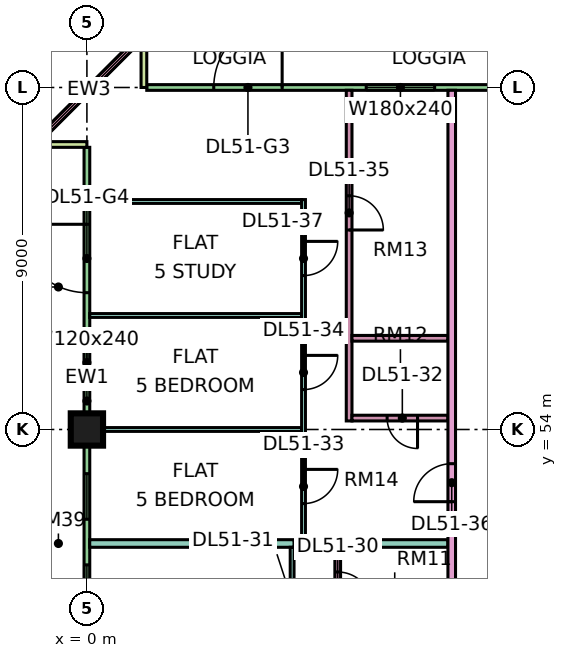
"""IFC4 building model, lengths in metres.
Left out: names, types, materials, properties, quantities, classifications, styles, units other than length and angle.
Written with IfcOpenShell. Run it as: python <this file> out.ifc"""

import sys

from ifc_helpers import new_model, si_unit, direction, frame, frame_2d, origin, origin_2d, place, context, subcontext, project, spatial, rectangle, extrude, element, fill, save


model = new_model("IFC4")
c1 = context("Model", 3, precision=1e-05, world=origin(), true_north=direction((0.0, 1.0)))
c2 = subcontext(c1, "Body", "Model", "MODEL_VIEW")
j1 = project(units=[si_unit("LENGTHUNIT", "METRE"), si_unit("PLANEANGLEUNIT", "RADIAN")], contexts=[c1])
p1 = place(None, origin())
s1 = spatial("IfcSite", under=j1, at=p1, CompositionType="ELEMENT")
p2 = place(p1, origin())
s2 = spatial("IfcBuilding", under=s1, at=p2, CompositionType="ELEMENT")
p3 = place(p2, frame((0.0, 0.0, 219.15)))
s3 = spatial("IfcBuildingStorey", under=s2, at=p3, CompositionType="ELEMENT", Elevation=219.15)
p4 = place(p3, frame((0.0, 54.0, 0.0), z_axis=(0.0, 0.0, 1.0), x_axis=(1.0, 0.0, 0.0)))
e1 = element("IfcColumn", 1, at=p4, inside=s3, PredefinedType="COLUMN", context=c2, shape_type="SweptSolid", body=[
    extrude(rectangle(XDim=0.85, YDim=0.85, at=origin_2d()), origin(), (0.0, 0.0, 1.0), 3.75),
])
p5 = place(p3, frame((11.925, 63.0, 0.0), z_axis=(0.0, 0.0, 1.0), x_axis=(-1.0, 0.0, 0.0)))
e2 = element("IfcWall", 2, at=p5, inside=s3, PredefinedType="SOLIDWALL", context=c2, shape_type="SweptSolid", body=[
    extrude(rectangle(XDim=10.35, YDim=0.15, at=frame_2d((5.175, 0.0))), origin(), (0.0, 0.0, 1.0), 3.35),
])
p6 = place(p5, frame((2.775, 0.0, 0.45)))
e3 = element("IfcOpeningElement", 3, at=p6, cuts=e2, PredefinedType="OPENING", context=c2, shape_type="SweptSolid", body=[
    extrude(rectangle(XDim=1.8, YDim=2.4, at=frame_2d((0.9, 1.2))), frame((0.0, 0.085, 0.0), z_axis=(0.0, -1.0, 0.0), x_axis=(1.0, 0.0, 0.0)), (0.0, 0.0, 1.0), 0.17),
])
p7 = place(p5, frame((6.788, 0.0, 0.0)))
e4 = element("IfcOpeningElement", 4, at=p7, cuts=e2, PredefinedType="OPENING", context=c2, shape_type="SweptSolid", body=[
    extrude(rectangle(XDim=1.8, YDim=2.4, at=frame_2d((0.9, 1.2))), frame((0.0, 0.085, 0.0), z_axis=(0.0, -1.0, 0.0), x_axis=(1.0, 0.0, 0.0)), (0.0, 0.0, 1.0), 0.17),
])
p8 = place(p3, frame((1.5, 64.5, 0.0), z_axis=(0.0, 0.0, 1.0), x_axis=(0.0, -1.0, 0.0)))
e5 = element("IfcWall", 5, at=p8, inside=s3, PredefinedType="SOLIDWALL", context=c2, shape_type="SweptSolid", body=[
    extrude(rectangle(XDim=1.5, YDim=0.15, at=frame_2d((0.75, 0.0))), origin(), (0.0, 0.0, 1.0), 3.35),
])
p9 = place(p3, frame((1.553, 64.447, 0.0), z_axis=(0.0, 0.0, 1.0), x_axis=(-0.707106781187, -0.707106781187, 0.0)))
e6 = element("IfcWall", 6, at=p9, inside=s3, PredefinedType="SOLIDWALL", context=c2, shape_type="SweptSolid", body=[
    extrude(rectangle(XDim=4.243, YDim=0.15, at=frame_2d((2.121, 0.0))), origin(), (0.0, 0.0, 1.0), 3.35),
])
p10 = place(p9, frame((0.621, 0.0, 0.45)))
e7 = element("IfcOpeningElement", 7, at=p10, cuts=e6, PredefinedType="OPENING", context=c2, shape_type="SweptSolid", body=[
    extrude(rectangle(XDim=3.0, YDim=2.4, at=frame_2d((1.5, 1.2))), frame((0.0, 0.085, 0.0), z_axis=(0.0, -1.0, 0.0), x_axis=(1.0, 0.0, 0.0)), (0.0, 0.0, 1.0), 0.17),
])
p11 = place(p3, frame((0.0, 61.425, 0.0), z_axis=(0.0, 0.0, 1.0), x_axis=(0.0, -1.0, 0.0)))
e8 = element("IfcWall", 8, at=p11, inside=s3, PredefinedType="SOLIDWALL", context=c2, shape_type="SweptSolid", body=[
    extrude(rectangle(XDim=13.35, YDim=0.15, at=frame_2d((6.675, 0.0))), origin(), (0.0, 0.0, 1.0), 3.35),
])
p12 = place(p11, frame((2.025, 0.0, 0.0)))
e9 = element("IfcOpeningElement", 9, at=p12, cuts=e8, PredefinedType="OPENING", context=c2, shape_type="SweptSolid", body=[
    extrude(rectangle(XDim=1.8, YDim=2.4, at=frame_2d((0.9, 1.2))), frame((0.0, 0.085, 0.0), z_axis=(0.0, -1.0, 0.0), x_axis=(1.0, 0.0, 0.0)), (0.0, 0.0, 1.0), 0.17),
])
p13 = place(p11, frame((5.062, 0.0, 0.45)))
e10 = element("IfcOpeningElement", 10, at=p13, cuts=e8, PredefinedType="OPENING", context=c2, shape_type="SweptSolid", body=[
    extrude(rectangle(XDim=1.2, YDim=2.4, at=frame_2d((0.6, 1.2))), frame((0.0, 0.085, 0.0), z_axis=(0.0, -1.0, 0.0), x_axis=(1.0, 0.0, 0.0)), (0.0, 0.0, 1.0), 0.17),
])
p14 = place(p11, frame((8.587, 0.0, 0.45)))
e11 = element("IfcOpeningElement", 11, at=p14, cuts=e8, PredefinedType="OPENING", context=c2, shape_type="SweptSolid", body=[
    extrude(rectangle(XDim=1.2, YDim=2.4, at=frame_2d((0.6, 1.2))), frame((0.0, 0.085, 0.0), z_axis=(0.0, -1.0, 0.0), x_axis=(1.0, 0.0, 0.0)), (0.0, 0.0, 1.0), 0.17),
])
p15 = place(p11, frame((10.988, 0.0, 0.45)))
e12 = element("IfcOpeningElement", 12, at=p15, cuts=e8, PredefinedType="OPENING", context=c2, shape_type="SweptSolid", body=[
    extrude(rectangle(XDim=1.8, YDim=2.4, at=frame_2d((0.9, 1.2))), frame((0.0, 0.085, 0.0), z_axis=(0.0, -1.0, 0.0), x_axis=(1.0, 0.0, 0.0)), (0.0, 0.0, 1.0), 0.17),
])
p16 = place(p3, frame((-1.5, 61.5, 0.0), z_axis=(0.0, 0.0, 1.0), x_axis=(1.0, 0.0, 0.0)))
e13 = element("IfcWall", 13, at=p16, inside=s3, PredefinedType="SOLIDWALL", context=c2, shape_type="SweptSolid", body=[
    extrude(rectangle(XDim=1.5, YDim=0.15, at=frame_2d((0.75, 0.0))), origin(), (0.0, 0.0, 1.0), 3.35),
])
p17 = place(p3, frame((0.074, 51.0, 0.0), z_axis=(0.0, 0.0, 1.0), x_axis=(1.0, 0.0, 0.0)))
e14 = element("IfcWall", 14, at=p17, inside=s3, PredefinedType="PARTITIONING", context=c2, shape_type="SweptSolid", body=[
    extrude(rectangle(XDim=5.376, YDim=0.2, at=frame_2d((2.688, 0.0))), origin(), (0.0, 0.0, 1.0), 3.35),
])
for number, where, z_axis, x_axis in (
    (15, (0.074, 54.0, 0.0), (0.0, 0.0, 1.0), (1.0, 0.0, 0.0)),
    (16, (0.074, 57.0, 0.0), (0.0, 0.0, 1.0), (1.0, 0.0, 0.0)),
    (17, (0.074, 60.0, 0.0), (0.0, 0.0, 1.0), (1.0, 0.0, 0.0)),
):
    element("IfcWall", number, at=place(p3, frame(where, z_axis=z_axis, x_axis=x_axis)), inside=s3, PredefinedType="PARTITIONING", context=c2, shape_type="SweptSolid", body=[
        extrude(rectangle(XDim=5.576, YDim=0.1, at=frame_2d((2.788, 0.0))), origin(), (0.0, 0.0, 1.0), 3.35),
    ])
p18 = place(p3, frame((5.4, 48.05, 0.0), z_axis=(0.0, 0.0, 1.0), x_axis=(0.0, 1.0, 0.0)))
e18 = element("IfcWall", 18, at=p18, inside=s3, PredefinedType="PARTITIONING", context=c2, shape_type="SweptSolid", body=[
    extrude(rectangle(XDim=2.85, YDim=0.1, at=frame_2d((1.425, 0.0))), origin(), (0.0, 0.0, 1.0), 3.35),
])
p19 = place(p18, frame((1.0, 0.0, 0.0)))
e19 = element("IfcOpeningElement", 19, at=p19, cuts=e18, PredefinedType="OPENING", context=c2, shape_type="SweptSolid", body=[
    extrude(rectangle(XDim=0.9, YDim=2.1, at=frame_2d((0.45, 1.05))), frame((0.0, 0.06, 0.0), z_axis=(0.0, -1.0, 0.0), x_axis=(1.0, 0.0, 0.0)), (0.0, 0.0, 1.0), 0.12),
])
p20 = place(p3, frame((5.65, 51.0, 0.0), z_axis=(0.0, 0.0, 1.0), x_axis=(1.0, 0.0, 0.0)))
e20 = element("IfcWall", 20, at=p20, inside=s3, PredefinedType="PARTITIONING", context=c2, shape_type="SweptSolid", body=[
    extrude(rectangle(XDim=3.85, YDim=0.2, at=frame_2d((1.925, 0.0))), origin(), (0.0, 0.0, 1.0), 3.35),
])
p21 = place(p3, frame((5.7, 51.1, 0.0), z_axis=(0.0, 0.0, 1.0), x_axis=(0.0, 1.0, 0.0)))
e21 = element("IfcWall", 21, at=p21, inside=s3, PredefinedType="PARTITIONING", context=c2, shape_type="SweptSolid", body=[
    extrude(rectangle(XDim=8.95, YDim=0.1, at=frame_2d((4.475, 0.0))), origin(), (0.0, 0.0, 1.0), 3.35),
])
p22 = place(p21, frame((0.95, 0.0, 0.0)))
e22 = element("IfcOpeningElement", 22, at=p22, cuts=e21, PredefinedType="OPENING", context=c2, shape_type="SweptSolid", body=[
    extrude(rectangle(XDim=0.9, YDim=2.1, at=frame_2d((0.45, 1.05))), frame((0.0, 0.06, 0.0), z_axis=(0.0, -1.0, 0.0), x_axis=(1.0, 0.0, 0.0)), (0.0, 0.0, 1.0), 0.12),
])
p23 = place(p21, frame((3.95, 0.0, 0.0)))
e23 = element("IfcOpeningElement", 23, at=p23, cuts=e21, PredefinedType="OPENING", context=c2, shape_type="SweptSolid", body=[
    extrude(rectangle(XDim=0.9, YDim=2.1, at=frame_2d((0.45, 1.05))), frame((0.0, 0.06, 0.0), z_axis=(0.0, -1.0, 0.0), x_axis=(1.0, 0.0, 0.0)), (0.0, 0.0, 1.0), 0.12),
])
p24 = place(p21, frame((6.95, 0.0, 0.0)))
e24 = element("IfcOpeningElement", 24, at=p24, cuts=e21, PredefinedType="OPENING", context=c2, shape_type="SweptSolid", body=[
    extrude(rectangle(XDim=0.9, YDim=2.1, at=frame_2d((0.45, 1.05))), frame((0.0, 0.06, 0.0), z_axis=(0.0, -1.0, 0.0), x_axis=(1.0, 0.0, 0.0)), (0.0, 0.0, 1.0), 0.12),
])
p25 = place(p3, frame((6.6, 39.25, 0.0), z_axis=(0.0, 0.0, 1.0), x_axis=(0.0, 1.0, 0.0)))
e25 = element("IfcWall", 25, at=p25, inside=s3, PredefinedType="PARTITIONING", context=c2, shape_type="SweptSolid", body=[
    extrude(rectangle(XDim=11.65, YDim=0.15, at=frame_2d((5.825, 0.0))), origin(), (0.0, 0.0, 1.0), 3.35),
])
p26 = place(p25, frame((3.5, 0.0, 0.0)))
e26 = element("IfcOpeningElement", 26, at=p26, cuts=e25, PredefinedType="OPENING", context=c2, shape_type="SweptSolid", body=[
    extrude(rectangle(XDim=0.8, YDim=2.1, at=frame_2d((0.4, 1.05))), frame((0.0, 0.085, 0.0), z_axis=(0.0, -1.0, 0.0), x_axis=(1.0, 0.0, 0.0)), (0.0, 0.0, 1.0), 0.17),
])
p27 = place(p25, frame((7.1, 0.0, 0.0)))
e27 = element("IfcOpeningElement", 27, at=p27, cuts=e25, PredefinedType="OPENING", context=c2, shape_type="SweptSolid", body=[
    extrude(rectangle(XDim=0.9, YDim=2.1, at=frame_2d((0.45, 1.05))), frame((0.0, 0.085, 0.0), z_axis=(0.0, -1.0, 0.0), x_axis=(1.0, 0.0, 0.0)), (0.0, 0.0, 1.0), 0.17),
])
p28 = place(p25, frame((10.1, 0.0, 0.0)))
e28 = element("IfcOpeningElement", 28, at=p28, cuts=e25, PredefinedType="OPENING", context=c2, shape_type="SweptSolid", body=[
    extrude(rectangle(XDim=0.9, YDim=2.1, at=frame_2d((0.45, 1.05))), frame((0.0, 0.085, 0.0), z_axis=(0.0, -1.0, 0.0), x_axis=(1.0, 0.0, 0.0)), (0.0, 0.0, 1.0), 0.17),
])
p29 = place(p3, frame((6.9, 54.225, 0.0), z_axis=(0.0, 0.0, 1.0), x_axis=(0.0, 1.0, 0.0)))
e29 = element("IfcWall", 29, at=p29, inside=s3, PredefinedType="PARTITIONING", context=c2, shape_type="SweptSolid", body=[
    extrude(rectangle(XDim=8.701, YDim=0.15, at=frame_2d((4.351, 0.0))), origin(), (0.0, 0.0, 1.0), 3.35),
])
p30 = place(p29, frame((5.025, 0.0, 0.0)))
e30 = element("IfcOpeningElement", 30, at=p30, cuts=e29, PredefinedType="OPENING", context=c2, shape_type="SweptSolid", body=[
    extrude(rectangle(XDim=0.9, YDim=2.1, at=frame_2d((0.45, 1.05))), frame((0.0, 0.085, 0.0), z_axis=(0.0, -1.0, 0.0), x_axis=(1.0, 0.0, 0.0)), (0.0, 0.0, 1.0), 0.17),
])
p31 = place(p3, frame((6.975, 54.3, 0.0), z_axis=(0.0, 0.0, 1.0), x_axis=(1.0, 0.0, 0.0)))
e31 = element("IfcWall", 31, at=p31, inside=s3, PredefinedType="PARTITIONING", context=c2, shape_type="SweptSolid", body=[
    extrude(rectangle(XDim=2.525, YDim=0.15, at=frame_2d((1.262, 0.0))), origin(), (0.0, 0.0, 1.0), 3.35),
])
p32 = place(p31, frame((0.925, 0.0, 0.0)))
e32 = element("IfcOpeningElement", 32, at=p32, cuts=e31, PredefinedType="OPENING", context=c2, shape_type="SweptSolid", body=[
    extrude(rectangle(XDim=0.8, YDim=2.1, at=frame_2d((0.4, 1.05))), frame((0.0, 0.085, 0.0), z_axis=(0.0, -1.0, 0.0), x_axis=(1.0, 0.0, 0.0)), (0.0, 0.0, 1.0), 0.17),
])
p33 = place(p3, frame((6.975, 56.4, 0.0), z_axis=(0.0, 0.0, 1.0), x_axis=(1.0, 0.0, 0.0)))
e33 = element("IfcWall", 33, at=p33, inside=s3, PredefinedType="PARTITIONING", context=c2, shape_type="SweptSolid", body=[
    extrude(rectangle(XDim=2.525, YDim=0.15, at=frame_2d((1.262, 0.0))), origin(), (0.0, 0.0, 1.0), 3.35),
])
p34 = place(p3, frame((9.6, 20.0, 0.0), z_axis=(0.0, 0.0, 1.0), x_axis=(0.0, 1.0, 0.0)))
e34 = element("IfcWall", 34, at=p34, inside=s3, PredefinedType="PARTITIONING", context=c2, shape_type="SweptSolid", body=[
    extrude(rectangle(XDim=42.926, YDim=0.2, at=frame_2d((21.463, 0.0))), origin(), (0.0, 0.0, 1.0), 3.35),
])
p35 = place(p34, frame((17.1, 0.0, 0.0)))
e35 = element("IfcOpeningElement", 35, at=p35, cuts=e34, PredefinedType="OPENING", context=c2, shape_type="SweptSolid", body=[
    extrude(rectangle(XDim=1.0, YDim=2.1, at=frame_2d((0.5, 1.05))), frame((0.0, 0.11, 0.0), z_axis=(0.0, -1.0, 0.0), x_axis=(1.0, 0.0, 0.0)), (0.0, 0.0, 1.0), 0.22),
])
p36 = place(p34, frame((32.1, 0.0, 0.0)))
e36 = element("IfcOpeningElement", 36, at=p36, cuts=e34, PredefinedType="OPENING", context=c2, shape_type="SweptSolid", body=[
    extrude(rectangle(XDim=1.0, YDim=2.1, at=frame_2d((0.5, 1.05))), frame((0.0, 0.11, 0.0), z_axis=(0.0, -1.0, 0.0), x_axis=(1.0, 0.0, 0.0)), (0.0, 0.0, 1.0), 0.22),
])
p37 = place(p34, frame((0.6, 0.0, 0.0)))
e37 = element("IfcOpeningElement", 37, at=p37, cuts=e34, PredefinedType="OPENING", context=c2, shape_type="SweptSolid", body=[
    extrude(rectangle(XDim=1.2, YDim=2.1, at=frame_2d((0.6, 1.05))), frame((0.0, 0.11, 0.0), z_axis=(0.0, -1.0, 0.0), x_axis=(1.0, 0.0, 0.0)), (0.0, 0.0, 1.0), 0.22),
])
p38 = place(p34, frame((14.1, 0.0, 0.0)))
e38 = element("IfcOpeningElement", 38, at=p38, cuts=e34, PredefinedType="OPENING", context=c2, shape_type="SweptSolid", body=[
    extrude(rectangle(XDim=1.0, YDim=2.1, at=frame_2d((0.5, 1.05))), frame((0.0, 0.11, 0.0), z_axis=(0.0, -1.0, 0.0), x_axis=(1.0, 0.0, 0.0)), (0.0, 0.0, 1.0), 0.22),
])
p39 = place(p6, origin())
e39 = element("IfcWindow", 39, at=p39, inside=s3, PartitioningType="SINGLE_PANEL", PredefinedType="WINDOW", context=c2, shape_type="SweptSolid", body=[
    extrude(rectangle(XDim=1.8, YDim=2.4, at=frame_2d((0.9, 1.2))), frame((0.0, 0.03, 0.0), z_axis=(0.0, -1.0, 0.0), x_axis=(1.0, 0.0, 0.0)), (0.0, 0.0, 1.0), 0.06),
])
fill(e3, e39)
p40 = place(p7, frame((1.8, 0.0, 0.0), z_axis=(0.0, 0.0, 1.0), x_axis=(-1.0, 0.0, 0.0)))
e40 = element("IfcDoor", 40, at=p40, inside=s3, OperationType="DOUBLE_DOOR_SINGLE_SWING", PredefinedType="DOOR", context=c2, shape_type="SweptSolid", body=[
    extrude(rectangle(XDim=1.8, YDim=2.4, at=frame_2d((0.9, 1.2))), frame((0.0, 0.025, 0.0), z_axis=(0.0, -1.0, 0.0), x_axis=(1.0, 0.0, 0.0)), (0.0, 0.0, 1.0), 0.05),
])
fill(e4, e40)
p41 = place(p10, origin())
e41 = element("IfcWindow", 41, at=p41, inside=s3, PartitioningType="SINGLE_PANEL", PredefinedType="WINDOW", context=c2, shape_type="SweptSolid", body=[
    extrude(rectangle(XDim=3.0, YDim=2.4, at=frame_2d((1.5, 1.2))), frame((0.0, 0.03, 0.0), z_axis=(0.0, -1.0, 0.0), x_axis=(1.0, 0.0, 0.0)), (0.0, 0.0, 1.0), 0.06),
])
fill(e7, e41)
p42 = place(p12, frame((1.8, 0.0, 0.0), z_axis=(0.0, 0.0, 1.0), x_axis=(-1.0, 0.0, 0.0)))
e42 = element("IfcDoor", 42, at=p42, inside=s3, OperationType="DOUBLE_DOOR_SINGLE_SWING", PredefinedType="DOOR", context=c2, shape_type="SweptSolid", body=[
    extrude(rectangle(XDim=1.8, YDim=2.4, at=frame_2d((0.9, 1.2))), frame((0.0, 0.025, 0.0), z_axis=(0.0, -1.0, 0.0), x_axis=(1.0, 0.0, 0.0)), (0.0, 0.0, 1.0), 0.05),
])
fill(e9, e42)
p43 = place(p13, origin())
e43 = element("IfcWindow", 43, at=p43, inside=s3, PartitioningType="SINGLE_PANEL", PredefinedType="WINDOW", context=c2, shape_type="SweptSolid", body=[
    extrude(rectangle(XDim=1.2, YDim=2.4, at=frame_2d((0.6, 1.2))), frame((0.0, 0.03, 0.0), z_axis=(0.0, -1.0, 0.0), x_axis=(1.0, 0.0, 0.0)), (0.0, 0.0, 1.0), 0.06),
])
fill(e10, e43)
p44 = place(p14, origin())
e44 = element("IfcWindow", 44, at=p44, inside=s3, PartitioningType="SINGLE_PANEL", PredefinedType="WINDOW", context=c2, shape_type="SweptSolid", body=[
    extrude(rectangle(XDim=1.2, YDim=2.4, at=frame_2d((0.6, 1.2))), frame((0.0, 0.03, 0.0), z_axis=(0.0, -1.0, 0.0), x_axis=(1.0, 0.0, 0.0)), (0.0, 0.0, 1.0), 0.06),
])
fill(e11, e44)
p45 = place(p15, origin())
e45 = element("IfcWindow", 45, at=p45, inside=s3, PartitioningType="SINGLE_PANEL", PredefinedType="WINDOW", context=c2, shape_type="SweptSolid", body=[
    extrude(rectangle(XDim=1.8, YDim=2.4, at=frame_2d((0.9, 1.2))), frame((0.0, 0.03, 0.0), z_axis=(0.0, -1.0, 0.0), x_axis=(1.0, 0.0, 0.0)), (0.0, 0.0, 1.0), 0.06),
])
fill(e12, e45)
p46 = place(p28, frame((0.9, 0.0, 0.0), z_axis=(0.0, 0.0, 1.0), x_axis=(-1.0, 0.0, 0.0)))
e46 = element("IfcDoor", 46, at=p46, inside=s3, OperationType="SINGLE_SWING_LEFT", PredefinedType="DOOR", context=c2, shape_type="SweptSolid", body=[
    extrude(rectangle(XDim=0.9, YDim=2.1, at=frame_2d((0.45, 1.05))), frame((0.0, 0.025, 0.0), z_axis=(0.0, -1.0, 0.0), x_axis=(1.0, 0.0, 0.0)), (0.0, 0.0, 1.0), 0.05),
])
fill(e28, e46)
p47 = place(p32, origin())
e47 = element("IfcDoor", 47, at=p47, inside=s3, OperationType="SINGLE_SWING_RIGHT", PredefinedType="DOOR", context=c2, shape_type="SweptSolid", body=[
    extrude(rectangle(XDim=0.8, YDim=2.1, at=frame_2d((0.4, 1.05))), frame((0.0, 0.025, 0.0), z_axis=(0.0, -1.0, 0.0), x_axis=(1.0, 0.0, 0.0)), (0.0, 0.0, 1.0), 0.05),
])
fill(e32, e47)
p48 = place(p22, origin())
e48 = element("IfcDoor", 48, at=p48, inside=s3, OperationType="SINGLE_SWING_RIGHT", PredefinedType="DOOR", context=c2, shape_type="SweptSolid", body=[
    extrude(rectangle(XDim=0.9, YDim=2.1, at=frame_2d((0.45, 1.05))), frame((0.0, 0.025, 0.0), z_axis=(0.0, -1.0, 0.0), x_axis=(1.0, 0.0, 0.0)), (0.0, 0.0, 1.0), 0.05),
])
fill(e22, e48)
p49 = place(p23, origin())
e49 = element("IfcDoor", 49, at=p49, inside=s3, OperationType="SINGLE_SWING_RIGHT", PredefinedType="DOOR", context=c2, shape_type="SweptSolid", body=[
    extrude(rectangle(XDim=0.9, YDim=2.1, at=frame_2d((0.45, 1.05))), frame((0.0, 0.025, 0.0), z_axis=(0.0, -1.0, 0.0), x_axis=(1.0, 0.0, 0.0)), (0.0, 0.0, 1.0), 0.05),
])
fill(e23, e49)
p50 = place(p30, frame((0.9, 0.0, 0.0), z_axis=(0.0, 0.0, 1.0), x_axis=(-1.0, 0.0, 0.0)))
e50 = element("IfcDoor", 50, at=p50, inside=s3, OperationType="SINGLE_SWING_LEFT", PredefinedType="DOOR", context=c2, shape_type="SweptSolid", body=[
    extrude(rectangle(XDim=0.9, YDim=2.1, at=frame_2d((0.45, 1.05))), frame((0.0, 0.025, 0.0), z_axis=(0.0, -1.0, 0.0), x_axis=(1.0, 0.0, 0.0)), (0.0, 0.0, 1.0), 0.05),
])
fill(e30, e50)
p51 = place(p36, origin())
e51 = element("IfcDoor", 51, at=p51, inside=s3, OperationType="SINGLE_SWING_LEFT", PredefinedType="DOOR", context=c2, shape_type="SweptSolid", body=[
    extrude(rectangle(XDim=1.0, YDim=2.1, at=frame_2d((0.5, 1.05))), frame((0.0, 0.025, 0.0), z_axis=(0.0, -1.0, 0.0), x_axis=(1.0, 0.0, 0.0)), (0.0, 0.0, 1.0), 0.05),
])
fill(e36, e51)
p52 = place(p24, origin())
e52 = element("IfcDoor", 52, at=p52, inside=s3, OperationType="SINGLE_SWING_RIGHT", PredefinedType="DOOR", context=c2, shape_type="SweptSolid", body=[
    extrude(rectangle(XDim=0.9, YDim=2.1, at=frame_2d((0.45, 1.05))), frame((0.0, 0.025, 0.0), z_axis=(0.0, -1.0, 0.0), x_axis=(1.0, 0.0, 0.0)), (0.0, 0.0, 1.0), 0.05),
])
fill(e24, e52)
save(model, sys.argv[1])
